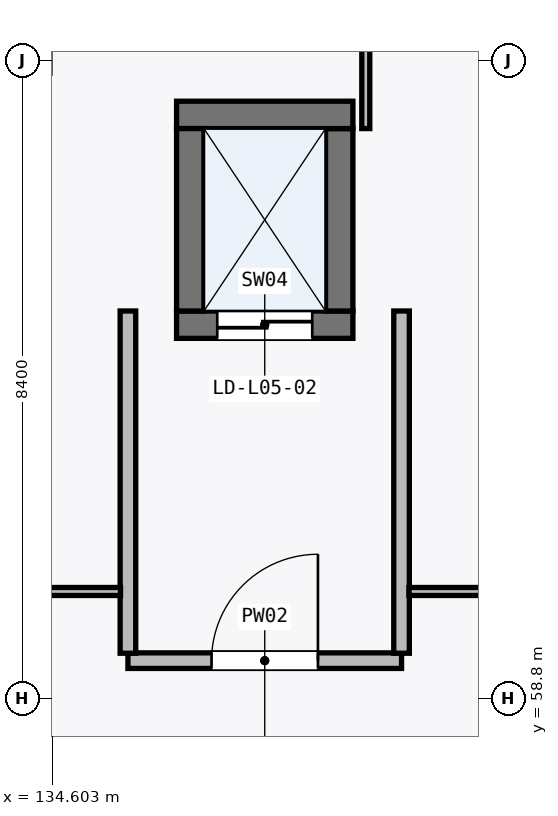
"""IFC4 building model, lengths in metres.
Left out: names, types, materials, properties, quantities, classifications, styles, units other than length and angle.
Written with IfcOpenShell. Run it as: python <this file> out.ifc"""

import sys

from ifc_helpers import new_model, si_unit, direction, frame, frame_2d, origin, place, context, subcontext, project, spatial, rectangle, extrude, element, fill, save


model = new_model("IFC4")
c1 = context("Model", 3, precision=1e-05, world=origin(), true_north=direction((0.0, 1.0)))
c2 = subcontext(c1, "Body", "Model", "MODEL_VIEW")
j1 = project(units=[si_unit("LENGTHUNIT", "METRE"), si_unit("PLANEANGLEUNIT", "RADIAN")], contexts=[c1])
p1 = place(None, origin())
s1 = spatial("IfcSite", under=j1, at=p1, CompositionType="ELEMENT")
p2 = place(p1, origin())
s2 = spatial("IfcBuilding", under=s1, at=p2, CompositionType="ELEMENT")
p3 = place(p2, frame((0.0, 0.0, 21.6)))
s3 = spatial("IfcBuildingStorey", under=s2, at=p3, CompositionType="ELEMENT", Elevation=21.6)
p4 = place(p3, frame((136.24, 63.72, 0.0), z_axis=(0.0, 0.0, 1.0), x_axis=(1.0, 0.0, 0.0)))
e1 = element("IfcWall", 1, at=p4, inside=s3, PredefinedType="SHEAR", context=c2, shape_type="SweptSolid", body=[
    extrude(rectangle(XDim=2.32, YDim=0.36, at=frame_2d((1.16, 0.0))), origin(), (0.0, 0.0, 1.0), 4.845),
])
p5 = place(p4, frame((0.535, 0.0, 0.0)))
e2 = element("IfcOpeningElement", 2, at=p5, cuts=e1, PredefinedType="OPENING", context=c2, shape_type="SweptSolid", body=[
    extrude(rectangle(XDim=1.25, YDim=2.2, at=frame_2d((0.625, 1.1))), frame((0.0, 0.19, 0.0), z_axis=(0.0, -1.0, 0.0), x_axis=(1.0, 0.0, 0.0)), (0.0, 0.0, 1.0), 0.38),
])
p6 = place(p3, frame((138.38, 63.9, 0.0), z_axis=(0.0, 0.0, 1.0), x_axis=(0.0, 1.0, 0.0)))
e3 = element("IfcWall", 3, at=p6, inside=s3, PredefinedType="SHEAR", context=c2, shape_type="SweptSolid", body=[
    extrude(rectangle(XDim=2.4, YDim=0.36, at=frame_2d((1.2, 0.0))), origin(), (0.0, 0.0, 1.0), 4.845),
])
p7 = place(p3, frame((138.56, 66.48, 0.0), z_axis=(0.0, 0.0, 1.0), x_axis=(-1.0, 0.0, 0.0)))
e4 = element("IfcWall", 4, at=p7, inside=s3, PredefinedType="SHEAR", context=c2, shape_type="SweptSolid", body=[
    extrude(rectangle(XDim=2.32, YDim=0.36, at=frame_2d((1.16, 0.0))), origin(), (0.0, 0.0, 1.0), 4.845),
])
p8 = place(p3, frame((136.42, 66.3, 0.0), z_axis=(0.0, 0.0, 1.0), x_axis=(0.0, -1.0, 0.0)))
e5 = element("IfcWall", 5, at=p8, inside=s3, PredefinedType="SHEAR", context=c2, shape_type="SweptSolid", body=[
    extrude(rectangle(XDim=2.4, YDim=0.36, at=frame_2d((1.2, 0.0))), origin(), (0.0, 0.0, 1.0), 4.845),
])
p9 = place(p3, frame((135.6, 59.3, 0.0), z_axis=(0.0, 0.0, 1.0), x_axis=(1.0, 0.0, 0.0)))
e6 = element("IfcWall", 6, at=p9, inside=s3, PredefinedType="PARTITIONING", context=c2, shape_type="SweptSolid", body=[
    extrude(rectangle(XDim=3.6, YDim=0.205, at=frame_2d((1.8, 0.0))), origin(), (0.0, 0.0, 1.0), 4.845),
])
p10 = place(p9, frame((1.1, 0.0, 0.0)))
e7 = element("IfcOpeningElement", 7, at=p10, cuts=e6, PredefinedType="OPENING", context=c2, shape_type="SweptSolid", body=[
    extrude(rectangle(XDim=1.4, YDim=2.15, at=frame_2d((0.7, 1.075))), frame((0.0, 0.113, 0.0), z_axis=(0.0, -1.0, 0.0), x_axis=(1.0, 0.0, 0.0)), (0.0, 0.0, 1.0), 0.225),
])
for number, where, z_axis, x_axis in (
    (8, (139.2, 59.397, 0.0), (0.0, 0.0, 1.0), (0.0, 1.0, 0.0)),
    (9, (135.6, 63.9, 0.0), (0.0, 0.0, 1.0), (0.0, -1.0, 0.0)),
):
    element("IfcWall", number, at=place(p3, frame(where, z_axis=z_axis, x_axis=x_axis)), inside=s3, PredefinedType="PARTITIONING", context=c2, shape_type="SweptSolid", body=[
        extrude(rectangle(XDim=4.502, YDim=0.205, at=frame_2d((2.251, 0.0))), origin(), (0.0, 0.0, 1.0), 4.845),
    ])
p11 = place(p3, frame((127.3, 60.21, 0.0), z_axis=(0.0, 0.0, 1.0), x_axis=(1.0, 0.0, 0.0)))
e10 = element("IfcWall", 10, at=p11, inside=s3, PredefinedType="PARTITIONING", context=c2, shape_type="SweptSolid", body=[
    extrude(rectangle(XDim=8.202, YDim=0.105, at=frame_2d((4.101, 0.0))), origin(), (0.0, 0.0, 1.0), 4.845),
])
p12 = place(p3, frame((138.729, 66.3, 0.0), z_axis=(0.0, 0.0, 1.0), x_axis=(0.0, 1.0, 0.0)))
e11 = element("IfcWall", 11, at=p12, inside=s3, PredefinedType="PARTITIONING", context=c2, shape_type="SweptSolid", body=[
    extrude(rectangle(XDim=8.046, YDim=0.105, at=frame_2d((4.023, 0.0))), origin(), (0.0, 0.0, 1.0), 4.845),
])
p13 = place(p3, frame((139.298, 60.21, 0.0), z_axis=(0.0, 0.0, 1.0), x_axis=(1.0, 0.0, 0.0)))
e12 = element("IfcWall", 12, at=p13, inside=s3, PredefinedType="PARTITIONING", context=c2, shape_type="SweptSolid", body=[
    extrude(rectangle(XDim=3.702, YDim=0.105, at=frame_2d((1.851, 0.0))), origin(), (0.0, 0.0, 1.0), 4.845),
])
p14 = place(p5, frame((1.25, 0.0, 0.0), z_axis=(0.0, 0.0, 1.0), x_axis=(-1.0, 0.0, 0.0)))
e13 = element("IfcDoor", 13, at=p14, inside=s3, OperationType="DOUBLE_DOOR_SLIDING", PredefinedType="DOOR", context=c2, shape_type="SweptSolid", body=[
    extrude(rectangle(XDim=1.25, YDim=2.2, at=frame_2d((0.625, 1.1))), frame((0.0, 0.025, 0.0), z_axis=(0.0, -1.0, 0.0), x_axis=(1.0, 0.0, 0.0)), (0.0, 0.0, 1.0), 0.05),
])
fill(e2, e13)
p15 = place(p10, origin())
e14 = element("IfcDoor", 14, at=p15, inside=s3, OperationType="SINGLE_SWING_RIGHT", PredefinedType="DOOR", context=c2, shape_type="SweptSolid", body=[
    extrude(rectangle(XDim=1.4, YDim=2.15, at=frame_2d((0.7, 1.075))), frame((0.0, 0.025, 0.0), z_axis=(0.0, -1.0, 0.0), x_axis=(1.0, 0.0, 0.0)), (0.0, 0.0, 1.0), 0.05),
])
fill(e7, e14)
save(model, sys.argv[1])
